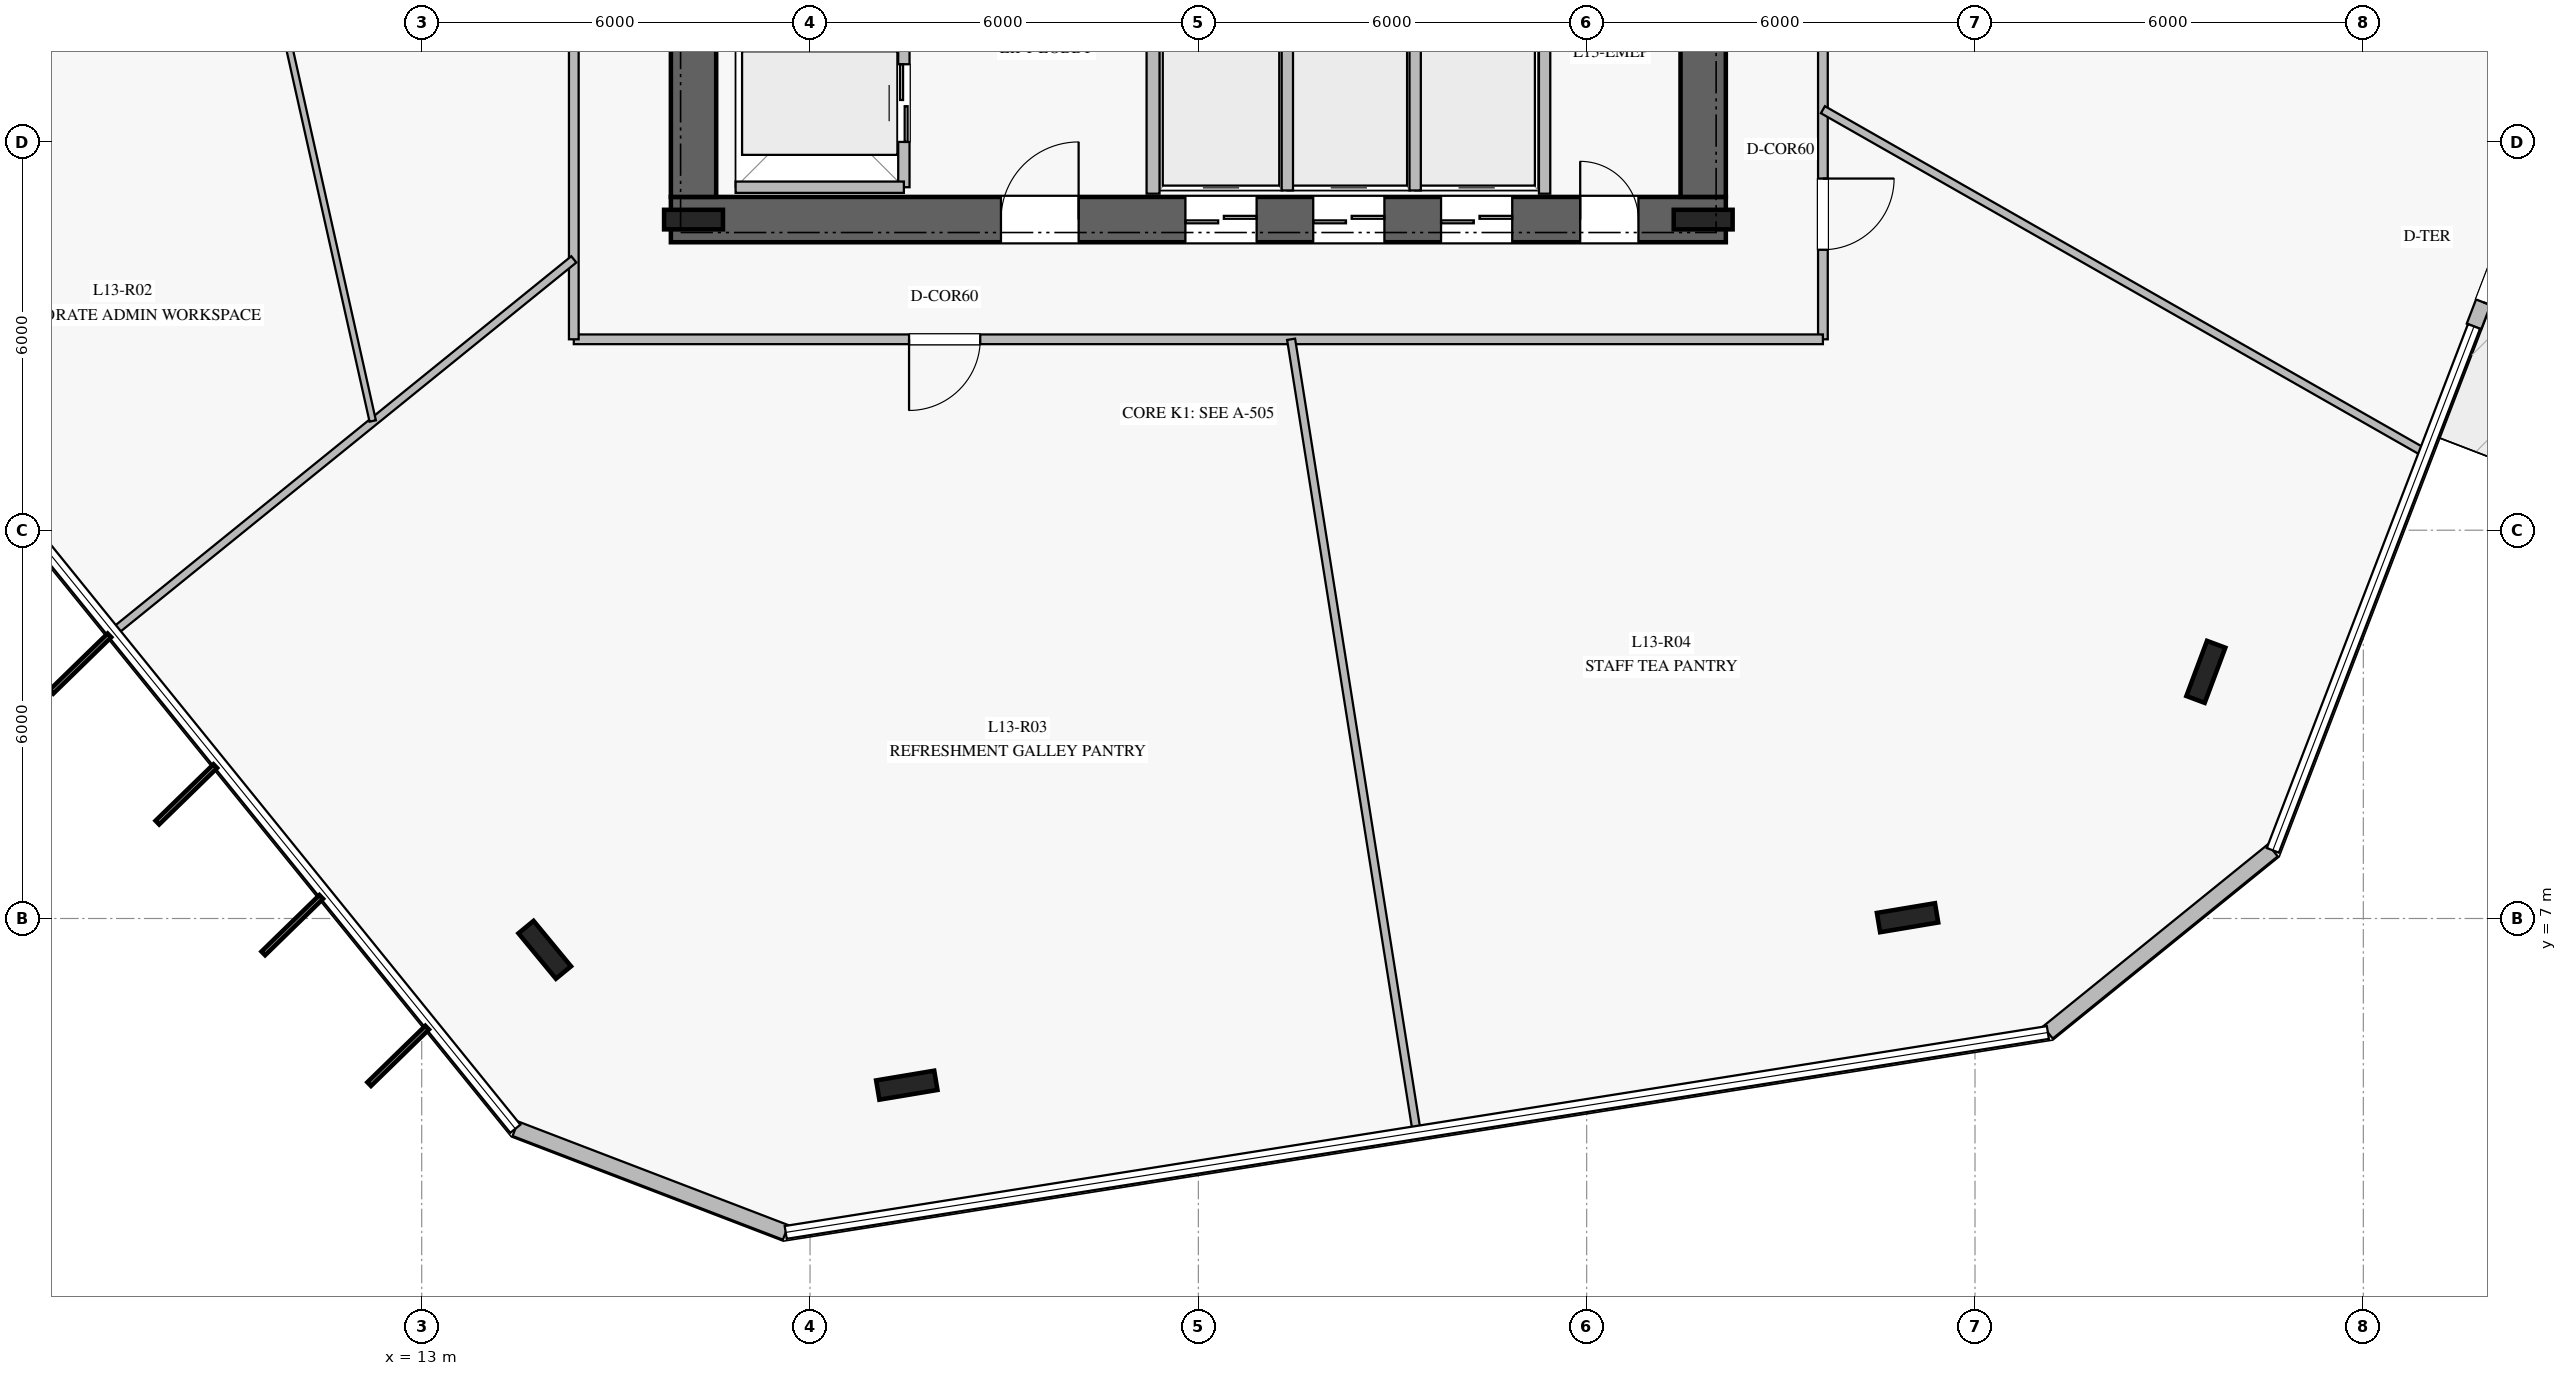
"""IFC4 building model, lengths in metres.
Left out: names, types, materials, properties, quantities, classifications, styles, units other than length and angle.
Written with IfcOpenShell. Run it as: python <this file> out.ifc"""

import sys

from ifc_helpers import new_model, si_unit, direction, frame, frame_2d, origin, origin_2d, place, context, subcontext, project, spatial, rectangle, i_section, extrude, element, fill, save


model = new_model("IFC4")
c1 = context("Model", 3, precision=1e-05, world=origin(), true_north=direction((0.0, 1.0)))
c2 = subcontext(c1, "Body", "Model", "MODEL_VIEW")
j1 = project(units=[si_unit("LENGTHUNIT", "METRE"), si_unit("PLANEANGLEUNIT", "RADIAN")], contexts=[c1])
p1 = place(None, origin())
s1 = spatial("IfcSite", under=j1, at=p1, CompositionType="ELEMENT")
p2 = place(p1, origin())
s2 = spatial("IfcBuilding", under=s1, at=p2, CompositionType="ELEMENT")
p3 = place(p2, frame((0.0, 0.0, 56.0)))
s3 = spatial("IfcBuildingStorey", under=s2, at=p3, CompositionType="ELEMENT", Elevation=56.0)
p4 = place(p3, frame((16.85, 17.8, 0.0), z_axis=(0.0, 0.0, 1.0), x_axis=(1.0, 0.0, 0.0)))
e1 = element("IfcWall", 1, at=p4, inside=s3, PredefinedType="SHEAR", context=c2, shape_type="SweptSolid", body=[
    extrude(rectangle(XDim=16.3, YDim=0.7, at=frame_2d((8.15, 0.0))), origin(), (0.0, 0.0, 1.0), 3.76),
])
p5 = place(p4, frame((5.1, 0.0, 0.0)))
e2 = element("IfcOpeningElement", 2, at=p5, cuts=e1, PredefinedType="OPENING", context=c2, shape_type="SweptSolid", body=[
    extrude(rectangle(XDim=1.2, YDim=2.25, at=frame_2d((0.6, 1.125))), frame((0.0, 0.36, 0.0), z_axis=(0.0, -1.0, 0.0), x_axis=(1.0, 0.0, 0.0)), (0.0, 0.0, 1.0), 0.72),
])
p6 = place(p4, frame((14.05, 0.0, 0.0)))
e3 = element("IfcOpeningElement", 3, at=p6, cuts=e1, PredefinedType="OPENING", context=c2, shape_type="SweptSolid", body=[
    extrude(rectangle(XDim=0.9, YDim=2.1, at=frame_2d((0.45, 1.05))), frame((0.0, 0.36, 0.0), z_axis=(0.0, -1.0, 0.0), x_axis=(1.0, 0.0, 0.0)), (0.0, 0.0, 1.0), 0.72),
])
p7 = place(p4, frame((7.95, 0.0, 0.0)))
e4 = element("IfcOpeningElement", 4, at=p7, cuts=e1, PredefinedType="OPENING", context=c2, shape_type="SweptSolid", body=[
    extrude(rectangle(XDim=1.1, YDim=2.2, at=frame_2d((0.55, 1.1))), frame((0.0, 0.36, 0.0), z_axis=(0.0, -1.0, 0.0), x_axis=(1.0, 0.0, 0.0)), (0.0, 0.0, 1.0), 0.72),
])
p8 = place(p4, frame((9.925, 0.0, 0.0)))
e5 = element("IfcOpeningElement", 5, at=p8, cuts=e1, PredefinedType="OPENING", context=c2, shape_type="SweptSolid", body=[
    extrude(rectangle(XDim=1.1, YDim=2.2, at=frame_2d((0.55, 1.1))), frame((0.0, 0.36, 0.0), z_axis=(0.0, -1.0, 0.0), x_axis=(1.0, 0.0, 0.0)), (0.0, 0.0, 1.0), 0.72),
])
p9 = place(p4, frame((11.9, 0.0, 0.0)))
e6 = element("IfcOpeningElement", 6, at=p9, cuts=e1, PredefinedType="OPENING", context=c2, shape_type="SweptSolid", body=[
    extrude(rectangle(XDim=1.1, YDim=2.2, at=frame_2d((0.55, 1.1))), frame((0.0, 0.36, 0.0), z_axis=(0.0, -1.0, 0.0), x_axis=(1.0, 0.0, 0.0)), (0.0, 0.0, 1.0), 0.72),
])
p10 = place(p3, frame((17.2, 31.85, 0.0), z_axis=(0.0, 0.0, 1.0), x_axis=(0.0, -1.0, 0.0)))
e7 = element("IfcWall", 7, at=p10, inside=s3, PredefinedType="SHEAR", context=c2, shape_type="SweptSolid", body=[
    extrude(rectangle(XDim=13.7, YDim=0.7, at=frame_2d((6.85, 0.0))), origin(), (0.0, 0.0, 1.0), 3.76),
])
p11 = place(p10, frame((2.0, 0.0, 0.0)))
e8 = element("IfcOpeningElement", 8, at=p11, cuts=e7, PredefinedType="OPENING", context=c2, shape_type="SweptSolid", body=[
    extrude(rectangle(XDim=1.5, YDim=2.2, at=frame_2d((0.75, 1.1))), frame((0.0, 0.36, 0.0), z_axis=(0.0, -1.0, 0.0), x_axis=(1.0, 0.0, 0.0)), (0.0, 0.0, 1.0), 0.72),
])
p12 = place(p3, frame((32.8, 18.15, 0.0), z_axis=(0.0, 0.0, 1.0), x_axis=(0.0, 1.0, 0.0)))
e9 = element("IfcWall", 9, at=p12, inside=s3, PredefinedType="SHEAR", context=c2, shape_type="SweptSolid", body=[
    extrude(rectangle(XDim=13.7, YDim=0.7, at=frame_2d((6.85, 0.0))), origin(), (0.0, 0.0, 1.0), 3.76),
])
for number, where, z_axis, x_axis in (
    (10, (17.2, 17.8, 0.0), (0.0, 0.0, 1.0), (1.0, 0.0, 0.0)),
    (11, (32.8, 17.8, 0.0), (0.0, 0.0, 1.0), (1.0, 0.0, 0.0)),
    (12, (14.901, 6.516, 0.0), (0.0, 0.0, 1.0), (-0.636, 0.772, 0.0)),
    (13, (20.495, 4.424, 0.0), (0.0, 0.0, 1.0), (0.986, 0.165, 0.0)),
    (14, (35.958, 7.012, 0.0), (0.0, 0.0, 1.0), (0.986, 0.165, 0.0)),
    (15, (40.567, 10.811, 0.0), (0.0, 0.0, 1.0), (0.35, 0.937, 0.0)),
):
    element("IfcColumn", number, at=place(p3, frame(where, z_axis=z_axis, x_axis=x_axis)), inside=s3, PredefinedType="COLUMN", context=c2, shape_type="SweptSolid", body=[
        extrude(i_section(OverallWidth=0.302, OverallDepth=0.91, WebThickness=0.021, FlangeThickness=0.04, at=origin_2d()), origin(), (0.0, 0.0, 1.0), 4.0),
    ])
p13 = place(p3, frame((14.447, 3.751, 0.0), z_axis=(0.0, 0.0, 1.0), x_axis=(0.933681352495, -0.358104917591, 0.0)))
e16 = element("IfcWall", 16, at=p13, inside=s3, PredefinedType="STANDARD", context=c2, shape_type="SweptSolid", body=[
    extrude(rectangle(XDim=4.474, YDim=0.24, at=frame_2d((2.237, 0.0))), origin(), (0.0, 0.0, 1.0), 3.76),
])
p14 = place(p3, frame((38.126, 5.238, 0.0), z_axis=(0.0, 0.0, 1.0), x_axis=(0.777138088211, 0.629330113574, 0.0)))
e17 = element("IfcWall", 17, at=p14, inside=s3, PredefinedType="STANDARD", context=c2, shape_type="SweptSolid", body=[
    extrude(rectangle(XDim=4.473, YDim=0.24, at=frame_2d((2.236, 0.0))), origin(), (0.0, 0.0, 1.0), 3.76),
])
p15 = place(p3, frame((44.71, 16.149, 0.0), z_axis=(0.0, 0.0, 1.0), x_axis=(0.35832469106, 0.933597030724, 0.0)))
e18 = element("IfcWall", 18, at=p15, inside=s3, PredefinedType="STANDARD", context=c2, shape_type="SweptSolid", body=[
    extrude(rectangle(XDim=2.4, YDim=0.24, at=frame_2d((1.2, 0.0))), origin(), (0.0, 0.0, 1.0), 3.76),
])
p16 = place(p15, frame((0.4, 0.0, 0.0)))
e19 = element("IfcOpeningElement", 19, at=p16, cuts=e18, PredefinedType="OPENING", context=c2, shape_type="SweptSolid", body=[
    extrude(rectangle(XDim=1.6, YDim=2.25, at=frame_2d((0.8, 1.125))), frame((0.0, 0.13, 0.0), z_axis=(0.0, -1.0, 0.0), x_axis=(1.0, 0.0, 0.0)), (0.0, 0.0, 1.0), 0.26),
])
p17 = place(p3, frame((24.3, 18.2, 0.0), z_axis=(0.0, 0.0, 1.0), x_axis=(0.0, 1.0, 0.0)))
e20 = element("IfcWall", 20, at=p17, inside=s3, PredefinedType="PARTITIONING", context=c2, shape_type="SweptSolid", body=[
    extrude(rectangle(XDim=5.15, YDim=0.2, at=frame_2d((2.575, 0.0))), origin(), (0.0, 0.0, 1.0), 3.76),
])
p18 = place(p3, frame((30.35, 18.2, 0.0), z_axis=(0.0, 0.0, 1.0), x_axis=(0.0, 1.0, 0.0)))
e21 = element("IfcWall", 21, at=p18, inside=s3, PredefinedType="PARTITIONING", context=c2, shape_type="SweptSolid", body=[
    extrude(rectangle(XDim=3.48, YDim=0.175, at=frame_2d((1.74, 0.0))), origin(), (0.0, 0.0, 1.0), 3.76),
])
for number, where, z_axis, x_axis in (
    (22, (26.375, 18.25, 0.0), (0.0, 0.0, 1.0), (0.0, 1.0, 0.0)),
    (23, (28.35, 18.25, 0.0), (0.0, 0.0, 1.0), (0.0, 1.0, 0.0)),
):
    element("IfcWall", number, at=place(p3, frame(where, z_axis=z_axis, x_axis=x_axis)), inside=s3, PredefinedType="PARTITIONING", context=c2, shape_type="SweptSolid", body=[
        extrude(rectangle(XDim=2.35, YDim=0.175, at=frame_2d((1.175, 0.0))), origin(), (0.0, 0.0, 1.0), 3.76),
    ])
p19 = place(p3, frame((20.45, 18.3, 0.0), z_axis=(0.0, 0.0, 1.0), x_axis=(0.0, 1.0, 0.0)))
e24 = element("IfcWall", 24, at=p19, inside=s3, PredefinedType="PARTITIONING", context=c2, shape_type="SweptSolid", body=[
    extrude(rectangle(XDim=2.6, YDim=0.175, at=frame_2d((1.3, 0.0))), origin(), (0.0, 0.0, 1.0), 3.76),
])
p20 = place(p19, frame((0.7, 0.0, 0.0)))
e25 = element("IfcOpeningElement", 25, at=p20, cuts=e24, PredefinedType="OPENING", context=c2, shape_type="SweptSolid", body=[
    extrude(rectangle(XDim=1.2, YDim=2.2, at=frame_2d((0.6, 1.1))), frame((0.0, 0.098, 0.0), z_axis=(0.0, -1.0, 0.0), x_axis=(1.0, 0.0, 0.0)), (0.0, 0.0, 1.0), 0.195),
])
p21 = place(p3, frame((17.85, 18.3, 0.0), z_axis=(0.0, 0.0, 1.0), x_axis=(1.0, 0.0, 0.0)))
e26 = element("IfcWall", 26, at=p21, inside=s3, PredefinedType="PARTITIONING", context=c2, shape_type="SweptSolid", body=[
    extrude(rectangle(XDim=2.6, YDim=0.175, at=frame_2d((1.3, 0.0))), origin(), (0.0, 0.0, 1.0), 3.76),
])
p22 = place(p3, frame((34.65, 34.05, 0.0), z_axis=(0.0, 0.0, 1.0), x_axis=(0.0, -1.0, 0.0)))
e27 = element("IfcWall", 27, at=p22, inside=s3, PredefinedType="PARTITIONING", context=c2, shape_type="SweptSolid", body=[
    extrude(rectangle(XDim=18.1, YDim=0.15, at=frame_2d((9.05, 0.0))), origin(), (0.0, 0.0, 1.0), 3.21),
])
p23 = place(p22, frame((15.616, 0.0, 0.0)))
e28 = element("IfcOpeningElement", 28, at=p23, cuts=e27, PredefinedType="OPENING", context=c2, shape_type="SweptSolid", body=[
    extrude(rectangle(XDim=1.1, YDim=2.2, at=frame_2d((0.55, 1.1))), frame((0.0, 0.085, 0.0), z_axis=(0.0, -1.0, 0.0), x_axis=(1.0, 0.0, 0.0)), (0.0, 0.0, 1.0), 0.17),
])
p24 = place(p22, frame((10.114, 0.0, 0.0)))
e29 = element("IfcOpeningElement", 29, at=p24, cuts=e27, PredefinedType="OPENING", context=c2, shape_type="SweptSolid", body=[
    extrude(rectangle(XDim=1.1, YDim=2.2, at=frame_2d((0.55, 1.1))), frame((0.0, 0.085, 0.0), z_axis=(0.0, -1.0, 0.0), x_axis=(1.0, 0.0, 0.0)), (0.0, 0.0, 1.0), 0.17),
])
p25 = place(p3, frame((34.65, 15.95, 0.0), z_axis=(0.0, 0.0, 1.0), x_axis=(-1.0, 0.0, 0.0)))
e30 = element("IfcWall", 30, at=p25, inside=s3, PredefinedType="PARTITIONING", context=c2, shape_type="SweptSolid", body=[
    extrude(rectangle(XDim=19.3, YDim=0.15, at=frame_2d((9.65, 0.0))), origin(), (0.0, 0.0, 1.0), 3.21),
])
p26 = place(p25, frame((13.02, 0.0, 0.0)))
e31 = element("IfcOpeningElement", 31, at=p26, cuts=e30, PredefinedType="OPENING", context=c2, shape_type="SweptSolid", body=[
    extrude(rectangle(XDim=1.1, YDim=2.2, at=frame_2d((0.55, 1.1))), frame((0.0, 0.085, 0.0), z_axis=(0.0, -1.0, 0.0), x_axis=(1.0, 0.0, 0.0)), (0.0, 0.0, 1.0), 0.17),
])
p27 = place(p3, frame((15.35, 15.95, 0.0), z_axis=(0.0, 0.0, 1.0), x_axis=(0.0, 1.0, 0.0)))
e32 = element("IfcWall", 32, at=p27, inside=s3, PredefinedType="PARTITIONING", context=c2, shape_type="SweptSolid", body=[
    extrude(rectangle(XDim=18.1, YDim=0.15, at=frame_2d((9.05, 0.0))), origin(), (0.0, 0.0, 1.0), 3.21),
])
p28 = place(p27, frame((5.617, 0.0, 0.0)))
e33 = element("IfcOpeningElement", 33, at=p28, cuts=e32, PredefinedType="OPENING", context=c2, shape_type="SweptSolid", body=[
    extrude(rectangle(XDim=1.1, YDim=2.2, at=frame_2d((0.55, 1.1))), frame((0.0, 0.085, 0.0), z_axis=(0.0, -1.0, 0.0), x_axis=(1.0, 0.0, 0.0)), (0.0, 0.0, 1.0), 0.17),
])
p29 = place(p3, frame((15.35, 17.185, 0.0), z_axis=(0.0, 0.0, 1.0), x_axis=(-0.777163973681, -0.629298147155, 0.0)))
e34 = element("IfcWall", 34, at=p29, inside=s3, PredefinedType="PARTITIONING", context=c2, shape_type="SweptSolid", body=[
    extrude(rectangle(XDim=9.137, YDim=0.125, at=frame_2d((4.569, 0.0))), origin(), (0.0, 0.0, 1.0), 3.06),
])
p30 = place(p3, frame((26.433, 15.95, 0.0), z_axis=(0.0, 0.0, 1.0), x_axis=(0.156473474013, -0.987682161391, 0.0)))
e35 = element("IfcWall", 35, at=p30, inside=s3, PredefinedType="PARTITIONING", context=c2, shape_type="SweptSolid", body=[
    extrude(rectangle(XDim=12.392, YDim=0.125, at=frame_2d((6.196, 0.0))), origin(), (0.0, 0.0, 1.0), 3.05),
])
p31 = place(p3, frame((34.65, 19.498, 0.0), z_axis=(0.0, 0.0, 1.0), x_axis=(0.868738483575, -0.495271084515, 0.0)))
e36 = element("IfcWall", 36, at=p31, inside=s3, PredefinedType="PARTITIONING", context=c2, shape_type="SweptSolid", body=[
    extrude(rectangle(XDim=10.697, YDim=0.125, at=frame_2d((5.349, 0.0))), origin(), (0.0, 0.0, 1.0), 3.06),
])
p32 = place(p3, frame((9.168, 28.44, 0.0), z_axis=(0.0, 0.0, 1.0), x_axis=(0.21821254902, -0.975901267265, 0.0)))
e37 = element("IfcWall", 37, at=p32, inside=s3, PredefinedType="MOVABLE", context=c2, shape_type="SweptSolid", body=[
    extrude(rectangle(XDim=14.092, YDim=0.1, at=frame_2d((7.046, 0.0))), origin(), (0.0, 0.0, 1.0), 3.02),
])
p33 = place(p32, frame((6.636, 0.0, 0.0)))
e38 = element("IfcOpeningElement", 38, at=p33, cuts=e37, PredefinedType="OPENING", context=c2, shape_type="SweptSolid", body=[
    extrude(rectangle(XDim=1.0, YDim=2.15, at=frame_2d((0.5, 1.075))), frame((0.0, 0.06, 0.0), z_axis=(0.0, -1.0, 0.0), x_axis=(1.0, 0.0, 0.0)), (0.0, 0.0, 1.0), 0.12),
])
p34 = place(p16, frame((1.6, 0.0, 0.0), z_axis=(0.0, 0.0, 1.0), x_axis=(-1.0, 0.0, 0.0)))
e39 = element("IfcDoor", 39, at=p34, inside=s3, OperationType="DOUBLE_DOOR_SINGLE_SWING", PredefinedType="DOOR", context=c2, shape_type="SweptSolid", body=[
    extrude(rectangle(XDim=1.6, YDim=2.25, at=frame_2d((0.8, 1.125))), frame((0.0, 0.025, 0.0), z_axis=(0.0, -1.0, 0.0), x_axis=(1.0, 0.0, 0.0)), (0.0, 0.0, 1.0), 0.05),
])
fill(e19, e39)
p35 = place(p5, origin())
e40 = element("IfcDoor", 40, at=p35, inside=s3, OperationType="SINGLE_SWING_RIGHT", PredefinedType="DOOR", context=c2, shape_type="SweptSolid", body=[
    extrude(rectangle(XDim=1.2, YDim=2.25, at=frame_2d((0.6, 1.125))), frame((0.0, 0.025, 0.0), z_axis=(0.0, -1.0, 0.0), x_axis=(1.0, 0.0, 0.0)), (0.0, 0.0, 1.0), 0.05),
])
fill(e2, e40)
p36 = place(p6, origin())
e41 = element("IfcDoor", 41, at=p36, inside=s3, OperationType="SINGLE_SWING_LEFT", PredefinedType="DOOR", context=c2, shape_type="SweptSolid", body=[
    extrude(rectangle(XDim=0.9, YDim=2.1, at=frame_2d((0.45, 1.05))), frame((0.0, 0.025, 0.0), z_axis=(0.0, -1.0, 0.0), x_axis=(1.0, 0.0, 0.0)), (0.0, 0.0, 1.0), 0.05),
])
fill(e3, e41)
p37 = place(p7, origin())
e42 = element("IfcDoor", 42, at=p37, inside=s3, OperationType="DOUBLE_DOOR_SLIDING", PredefinedType="DOOR", context=c2, shape_type="SweptSolid", body=[
    extrude(rectangle(XDim=1.1, YDim=2.2, at=frame_2d((0.55, 1.1))), frame((0.0, 0.025, 0.0), z_axis=(0.0, -1.0, 0.0), x_axis=(1.0, 0.0, 0.0)), (0.0, 0.0, 1.0), 0.05),
])
fill(e4, e42)
p38 = place(p8, origin())
e43 = element("IfcDoor", 43, at=p38, inside=s3, OperationType="DOUBLE_DOOR_SLIDING", PredefinedType="DOOR", context=c2, shape_type="SweptSolid", body=[
    extrude(rectangle(XDim=1.1, YDim=2.2, at=frame_2d((0.55, 1.1))), frame((0.0, 0.025, 0.0), z_axis=(0.0, -1.0, 0.0), x_axis=(1.0, 0.0, 0.0)), (0.0, 0.0, 1.0), 0.05),
])
fill(e5, e43)
p39 = place(p9, origin())
e44 = element("IfcDoor", 44, at=p39, inside=s3, OperationType="DOUBLE_DOOR_SLIDING", PredefinedType="DOOR", context=c2, shape_type="SweptSolid", body=[
    extrude(rectangle(XDim=1.1, YDim=2.2, at=frame_2d((0.55, 1.1))), frame((0.0, 0.025, 0.0), z_axis=(0.0, -1.0, 0.0), x_axis=(1.0, 0.0, 0.0)), (0.0, 0.0, 1.0), 0.05),
])
fill(e6, e44)
p40 = place(p20, origin())
e45 = element("IfcDoor", 45, at=p40, inside=s3, OperationType="DOUBLE_DOOR_SLIDING", PredefinedType="DOOR", context=c2, shape_type="SweptSolid", body=[
    extrude(rectangle(XDim=1.2, YDim=2.2, at=frame_2d((0.6, 1.1))), frame((0.0, 0.025, 0.0), z_axis=(0.0, -1.0, 0.0), x_axis=(1.0, 0.0, 0.0)), (0.0, 0.0, 1.0), 0.05),
])
fill(e25, e45)
p41 = place(p26, origin())
e46 = element("IfcDoor", 46, at=p41, inside=s3, OperationType="SINGLE_SWING_RIGHT", PredefinedType="DOOR", context=c2, shape_type="SweptSolid", body=[
    extrude(rectangle(XDim=1.1, YDim=2.2, at=frame_2d((0.55, 1.1))), frame((0.0, 0.025, 0.0), z_axis=(0.0, -1.0, 0.0), x_axis=(1.0, 0.0, 0.0)), (0.0, 0.0, 1.0), 0.05),
])
fill(e31, e46)
p42 = place(p23, origin())
e47 = element("IfcDoor", 47, at=p42, inside=s3, OperationType="SINGLE_SWING_LEFT", PredefinedType="DOOR", context=c2, shape_type="SweptSolid", body=[
    extrude(rectangle(XDim=1.1, YDim=2.2, at=frame_2d((0.55, 1.1))), frame((0.0, 0.025, 0.0), z_axis=(0.0, -1.0, 0.0), x_axis=(1.0, 0.0, 0.0)), (0.0, 0.0, 1.0), 0.05),
])
fill(e28, e47)
save(model, sys.argv[1])
